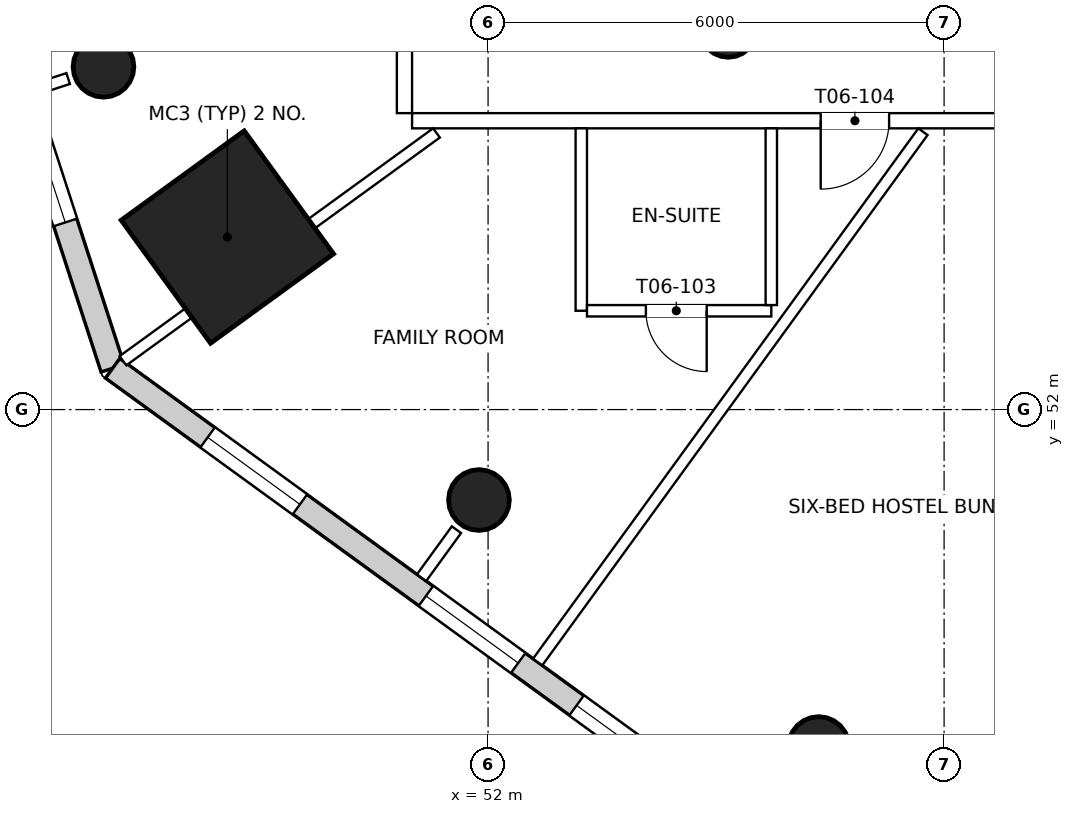
"""IFC4 building model, lengths in metres.
Left out: names, types, materials, properties, quantities, classifications, styles, units other than length and angle.
Written with IfcOpenShell. Run it as: python <this file> out.ifc"""

import sys

from ifc_helpers import new_model, si_unit, direction, frame, frame_2d, origin, origin_2d, place, context, subcontext, project, spatial, rectangle, circle, extrude, element, fill, save


model = new_model("IFC4")
c1 = context("Model", 3, precision=1e-05, world=origin(), true_north=direction((0.0, 1.0)))
c2 = subcontext(c1, "Body", "Model", "MODEL_VIEW")
j1 = project(units=[si_unit("LENGTHUNIT", "METRE"), si_unit("PLANEANGLEUNIT", "RADIAN")], contexts=[c1])
p1 = place(None, origin())
s1 = spatial("IfcSite", under=j1, at=p1, CompositionType="ELEMENT")
p2 = place(p1, origin())
s2 = spatial("IfcBuilding", under=s1, at=p2, CompositionType="ELEMENT")
p3 = place(p2, frame((0.0, 0.0, 98.6)))
s3 = spatial("IfcBuildingStorey", under=s2, at=p3, CompositionType="ELEMENT", Elevation=98.6)
p4 = place(p3, frame((46.94, 56.51, 0.0), z_axis=(0.0, 0.0, 1.0), x_axis=(1.0, 0.0, 0.0)))
e1 = element("IfcColumn", 1, at=p4, inside=s3, PredefinedType="COLUMN", context=c2, shape_type="SweptSolid", body=[
    extrude(circle(Radius=0.4, at=origin_2d()), origin(), (0.0, 0.0, 1.0), 3.9),
])
p5 = place(p3, frame((48.57, 54.27, 0.0), z_axis=(0.0, 0.0, 1.0), x_axis=(-0.809016994375, -0.587785252292, 0.0)))
e2 = element("IfcColumn", 2, at=p5, inside=s3, PredefinedType="COLUMN", context=c2, shape_type="SweptSolid", body=[
    extrude(rectangle(XDim=2.0, YDim=2.0, at=origin_2d()), origin(), (0.0, 0.0, 1.0), 3.9),
])
for number, where, z_axis, x_axis in (
    (3, (51.88, 50.81, 0.0), (0.0, 0.0, 1.0), (1.0, 0.0, 0.0)),
    (4, (56.35, 47.56, 0.0), (0.0, 0.0, 1.0), (1.0, 0.0, 0.0)),
):
    element("IfcColumn", number, at=place(p3, frame(where, z_axis=z_axis, x_axis=x_axis)), inside=s3, PredefinedType="COLUMN", context=c2, shape_type="SweptSolid", body=[
        extrude(circle(Radius=0.4, at=origin_2d()), origin(), (0.0, 0.0, 1.0), 3.9),
    ])
p6 = place(p3, frame((55.16, 57.01, 0.0), z_axis=(0.0, 0.0, 1.0), x_axis=(1.0, 0.0, 0.0)))
e5 = element("IfcColumn", 5, at=p6, inside=s3, PredefinedType="COLUMN", context=c2, shape_type="SweptSolid", body=[
    extrude(circle(Radius=0.375, at=origin_2d()), origin(), (0.0, 0.0, 1.0), 3.9),
])
p7 = place(p3, frame((44.238, 61.231, 0.0), z_axis=(0.0, 0.0, 1.0), x_axis=(0.309026240246, -0.95105351208, 0.0)))
e6 = element("IfcWall", 6, at=p7, inside=s3, PredefinedType="SOLIDWALL", context=c2, shape_type="SweptSolid", body=[
    extrude(rectangle(XDim=9.134, YDim=0.32, at=frame_2d((4.567, 0.0))), origin(), (0.0, 0.0, 1.0), 3.6),
])
p8 = place(p7, frame((2.267, 0.0, 0.9)))
e7 = element("IfcOpeningElement", 7, at=p8, cuts=e6, PredefinedType="OPENING", context=c2, shape_type="SweptSolid", body=[
    extrude(rectangle(XDim=1.6, YDim=1.8, at=frame_2d((0.8, 0.9))), frame((0.0, 0.17, 0.0), z_axis=(0.0, -1.0, 0.0), x_axis=(1.0, 0.0, 0.0)), (0.0, 0.0, 1.0), 0.34),
])
p9 = place(p7, frame((5.517, 0.0, 0.9)))
e8 = element("IfcOpeningElement", 8, at=p9, cuts=e6, PredefinedType="OPENING", context=c2, shape_type="SweptSolid", body=[
    extrude(rectangle(XDim=1.6, YDim=1.8, at=frame_2d((0.8, 0.9))), frame((0.0, 0.17, 0.0), z_axis=(0.0, -1.0, 0.0), x_axis=(1.0, 0.0, 0.0)), (0.0, 0.0, 1.0), 0.34),
])
p10 = place(p3, frame((47.06, 52.543, 0.0), z_axis=(0.0, 0.0, 1.0), x_axis=(0.809012643171, -0.587791241165, 0.0)))
e9 = element("IfcWall", 9, at=p10, inside=s3, PredefinedType="SOLIDWALL", context=c2, shape_type="SweptSolid", body=[
    extrude(rectangle(XDim=22.592, YDim=0.32, at=frame_2d((11.296, 0.0))), origin(), (0.0, 0.0, 1.0), 3.6),
])
p11 = place(p10, frame((1.546, 0.0, 0.9)))
e10 = element("IfcOpeningElement", 10, at=p11, cuts=e9, PredefinedType="OPENING", context=c2, shape_type="SweptSolid", body=[
    extrude(rectangle(XDim=1.5, YDim=1.8, at=frame_2d((0.75, 0.9))), frame((0.0, 0.17, 0.0), z_axis=(0.0, -1.0, 0.0), x_axis=(1.0, 0.0, 0.0)), (0.0, 0.0, 1.0), 0.34),
])
p12 = place(p10, frame((5.096, 0.0, 0.9)))
e11 = element("IfcOpeningElement", 11, at=p12, cuts=e9, PredefinedType="OPENING", context=c2, shape_type="SweptSolid", body=[
    extrude(rectangle(XDim=1.5, YDim=1.8, at=frame_2d((0.75, 0.9))), frame((0.0, 0.17, 0.0), z_axis=(0.0, -1.0, 0.0), x_axis=(1.0, 0.0, 0.0)), (0.0, 0.0, 1.0), 0.34),
])
p13 = place(p10, frame((7.546, 0.0, 0.9)))
e12 = element("IfcOpeningElement", 12, at=p13, cuts=e9, PredefinedType="OPENING", context=c2, shape_type="SweptSolid", body=[
    extrude(rectangle(XDim=1.5, YDim=1.8, at=frame_2d((0.75, 0.9))), frame((0.0, 0.17, 0.0), z_axis=(0.0, -1.0, 0.0), x_axis=(1.0, 0.0, 0.0)), (0.0, 0.0, 1.0), 0.34),
])
p14 = place(p10, frame((10.646, 0.0, 0.9)))
e13 = element("IfcOpeningElement", 13, at=p14, cuts=e9, PredefinedType="OPENING", context=c2, shape_type="SweptSolid", body=[
    extrude(rectangle(XDim=1.5, YDim=1.8, at=frame_2d((0.75, 0.9))), frame((0.0, 0.17, 0.0), z_axis=(0.0, -1.0, 0.0), x_axis=(1.0, 0.0, 0.0)), (0.0, 0.0, 1.0), 0.34),
])
p15 = place(p10, frame((13.546, 0.0, 0.9)))
e14 = element("IfcOpeningElement", 14, at=p15, cuts=e9, PredefinedType="OPENING", context=c2, shape_type="SweptSolid", body=[
    extrude(rectangle(XDim=1.5, YDim=1.8, at=frame_2d((0.75, 0.9))), frame((0.0, 0.17, 0.0), z_axis=(0.0, -1.0, 0.0), x_axis=(1.0, 0.0, 0.0)), (0.0, 0.0, 1.0), 0.34),
])
p16 = place(p10, frame((16.546, 0.0, 0.9)))
e15 = element("IfcOpeningElement", 15, at=p16, cuts=e9, PredefinedType="OPENING", context=c2, shape_type="SweptSolid", body=[
    extrude(rectangle(XDim=1.5, YDim=1.8, at=frame_2d((0.75, 0.9))), frame((0.0, 0.17, 0.0), z_axis=(0.0, -1.0, 0.0), x_axis=(1.0, 0.0, 0.0)), (0.0, 0.0, 1.0), 0.34),
])
p17 = place(p10, frame((19.546, 0.0, 0.9)))
e16 = element("IfcOpeningElement", 16, at=p17, cuts=e9, PredefinedType="OPENING", context=c2, shape_type="SweptSolid", body=[
    extrude(rectangle(XDim=1.5, YDim=1.8, at=frame_2d((0.75, 0.9))), frame((0.0, 0.17, 0.0), z_axis=(0.0, -1.0, 0.0), x_axis=(1.0, 0.0, 0.0)), (0.0, 0.0, 1.0), 0.34),
])
p18 = place(p3, frame((58.946, 55.8, 0.0), z_axis=(0.0, 0.0, 1.0), x_axis=(-1.0, 0.0, 0.0)))
e17 = element("IfcWall", 17, at=p18, inside=s3, PredefinedType="PARTITIONING", context=c2, shape_type="SweptSolid", body=[
    extrude(rectangle(XDim=7.946, YDim=0.2, at=frame_2d((3.973, 0.0))), origin(), (0.0, 0.0, 1.0), 3.0),
])
p19 = place(p18, frame((1.669, 0.0, 0.0)))
e18 = element("IfcOpeningElement", 18, at=p19, cuts=e17, PredefinedType="OPENING", context=c2, shape_type="SweptSolid", body=[
    extrude(rectangle(XDim=0.9, YDim=2.1, at=frame_2d((0.45, 1.05))), frame((0.0, 0.11, 0.0), z_axis=(0.0, -1.0, 0.0), x_axis=(1.0, 0.0, 0.0)), (0.0, 0.0, 1.0), 0.22),
])
p20 = place(p3, frame((50.9, 55.9, 0.0), z_axis=(0.0, 0.0, 1.0), x_axis=(0.0, 1.0, 0.0)))
e19 = element("IfcWall", 19, at=p20, inside=s3, PredefinedType="PARTITIONING", context=c2, shape_type="SweptSolid", body=[
    extrude(rectangle(XDim=7.95, YDim=0.2, at=frame_2d((3.975, 0.0))), origin(), (0.0, 0.0, 1.0), 3.6),
])
p21 = place(p20, frame((2.165, 0.0, 0.0)))
e20 = element("IfcOpeningElement", 20, at=p21, cuts=e19, PredefinedType="OPENING", context=c2, shape_type="SweptSolid", body=[
    extrude(rectangle(XDim=0.9, YDim=2.1, at=frame_2d((0.45, 1.05))), frame((0.0, 0.11, 0.0), z_axis=(0.0, -1.0, 0.0), x_axis=(1.0, 0.0, 0.0)), (0.0, 0.0, 1.0), 0.22),
])
p22 = place(p20, frame((6.228, 0.0, 0.0)))
e21 = element("IfcOpeningElement", 21, at=p22, cuts=e19, PredefinedType="OPENING", context=c2, shape_type="SweptSolid", body=[
    extrude(rectangle(XDim=0.9, YDim=2.1, at=frame_2d((0.45, 1.05))), frame((0.0, 0.11, 0.0), z_axis=(0.0, -1.0, 0.0), x_axis=(1.0, 0.0, 0.0)), (0.0, 0.0, 1.0), 0.22),
])
p23 = place(p3, frame((47.196, 52.642, 0.0), z_axis=(0.0, 0.0, 1.0), x_axis=(0.809009310944, 0.587795827483, 0.0)))
e22 = element("IfcWall", 22, at=p23, inside=s3, PredefinedType="PARTITIONING", context=c2, shape_type="SweptSolid", body=[
    extrude(rectangle(XDim=5.099, YDim=0.15, at=frame_2d((2.549, 0.0))), origin(), (0.0, 0.0, 1.0), 3.6),
])
p24 = place(p3, frame((52.652, 48.678, 0.0), z_axis=(0.0, 0.0, 1.0), x_axis=(0.587774405354, 0.809024875026, 0.0)))
e23 = element("IfcWall", 23, at=p24, inside=s3, PredefinedType="PARTITIONING", context=c2, shape_type="SweptSolid", body=[
    extrude(rectangle(XDim=8.625, YDim=0.15, at=frame_2d((4.312, 0.0))), origin(), (0.0, 0.0, 1.0), 3.0),
])
p25 = place(p3, frame((57.506, 45.152, 0.0), z_axis=(0.0, 0.0, 1.0), x_axis=(0.587783184234, 0.809018496903, 0.0)))
e24 = element("IfcWall", 24, at=p25, inside=s3, PredefinedType="PARTITIONING", context=c2, shape_type="SweptSolid", body=[
    extrude(rectangle(XDim=9.38, YDim=0.15, at=frame_2d((4.69, 0.0))), origin(), (0.0, 0.0, 1.0), 3.0),
])
p26 = place(p3, frame((53.227, 55.7, 0.0), z_axis=(0.0, 0.0, 1.0), x_axis=(0.0, -1.0, 0.0)))
e25 = element("IfcWall", 25, at=p26, inside=s3, PredefinedType="PARTITIONING", context=c2, shape_type="SweptSolid", body=[
    extrude(rectangle(XDim=2.4, YDim=0.15, at=frame_2d((1.2, 0.0))), origin(), (0.0, 0.0, 1.0), 3.6),
])
p27 = place(p3, frame((55.727, 53.3, 0.0), z_axis=(0.0, 0.0, 1.0), x_axis=(-1.0, 0.0, 0.0)))
e26 = element("IfcWall", 26, at=p27, inside=s3, PredefinedType="PARTITIONING", context=c2, shape_type="SweptSolid", body=[
    extrude(rectangle(XDim=2.425, YDim=0.15, at=frame_2d((1.212, 0.0))), origin(), (0.0, 0.0, 1.0), 3.6),
])
p28 = place(p27, frame((0.85, 0.0, 0.0)))
e27 = element("IfcOpeningElement", 27, at=p28, cuts=e26, PredefinedType="OPENING", context=c2, shape_type="SweptSolid", body=[
    extrude(rectangle(XDim=0.8, YDim=2.1, at=frame_2d((0.4, 1.05))), frame((0.0, 0.085, 0.0), z_axis=(0.0, -1.0, 0.0), x_axis=(1.0, 0.0, 0.0)), (0.0, 0.0, 1.0), 0.17),
])
p29 = place(p3, frame((55.727, 55.7, 0.0), z_axis=(0.0, 0.0, 1.0), x_axis=(0.0, -1.0, 0.0)))
e28 = element("IfcWall", 28, at=p29, inside=s3, PredefinedType="PARTITIONING", context=c2, shape_type="SweptSolid", body=[
    extrude(rectangle(XDim=2.325, YDim=0.15, at=frame_2d((1.163, 0.0))), origin(), (0.0, 0.0, 1.0), 3.6),
])
p30 = place(p3, frame((46.475, 56.355, 0.0), z_axis=(0.0, 0.0, 1.0), x_axis=(-0.951037957901, -0.309074105406, 0.0)))
e29 = element("IfcWall", 29, at=p30, inside=s3, PredefinedType="PARTITIONING", context=c2, shape_type="SweptSolid", body=[
    extrude(rectangle(XDim=0.461, YDim=0.15, at=frame_2d((0.231, 0.0))), origin(), (0.0, 0.0, 1.0), 3.6),
])
p31 = place(p3, frame((51.584, 50.42, 0.0), z_axis=(0.0, 0.0, 1.0), x_axis=(-0.587874171241, -0.808952383511, 0.0)))
e30 = element("IfcWall", 30, at=p31, inside=s3, PredefinedType="PARTITIONING", context=c2, shape_type="SweptSolid", body=[
    extrude(rectangle(XDim=0.781, YDim=0.15, at=frame_2d((0.39, 0.0))), origin(), (0.0, 0.0, 1.0), 3.6),
])
p32 = place(p9, origin())
e31 = element("IfcWindow", 31, at=p32, inside=s3, PartitioningType="SINGLE_PANEL", PredefinedType="WINDOW", context=c2, shape_type="SweptSolid", body=[
    extrude(rectangle(XDim=1.6, YDim=1.8, at=frame_2d((0.8, 0.9))), frame((0.0, 0.07, 0.0), z_axis=(0.0, -1.0, 0.0), x_axis=(1.0, 0.0, 0.0)), (0.0, 0.0, 1.0), 0.06),
])
fill(e8, e31)
p33 = place(p11, origin())
e32 = element("IfcWindow", 32, at=p33, inside=s3, PartitioningType="SINGLE_PANEL", PredefinedType="WINDOW", context=c2, shape_type="SweptSolid", body=[
    extrude(rectangle(XDim=1.5, YDim=1.8, at=frame_2d((0.75, 0.9))), frame((0.0, 0.07, 0.0), z_axis=(0.0, -1.0, 0.0), x_axis=(1.0, 0.0, 0.0)), (0.0, 0.0, 1.0), 0.06),
])
fill(e10, e32)
p34 = place(p12, origin())
e33 = element("IfcWindow", 33, at=p34, inside=s3, PartitioningType="SINGLE_PANEL", PredefinedType="WINDOW", context=c2, shape_type="SweptSolid", body=[
    extrude(rectangle(XDim=1.5, YDim=1.8, at=frame_2d((0.75, 0.9))), frame((0.0, 0.07, 0.0), z_axis=(0.0, -1.0, 0.0), x_axis=(1.0, 0.0, 0.0)), (0.0, 0.0, 1.0), 0.06),
])
fill(e11, e33)
p35 = place(p13, origin())
e34 = element("IfcWindow", 34, at=p35, inside=s3, PartitioningType="SINGLE_PANEL", PredefinedType="WINDOW", context=c2, shape_type="SweptSolid", body=[
    extrude(rectangle(XDim=1.5, YDim=1.8, at=frame_2d((0.75, 0.9))), frame((0.0, 0.07, 0.0), z_axis=(0.0, -1.0, 0.0), x_axis=(1.0, 0.0, 0.0)), (0.0, 0.0, 1.0), 0.06),
])
fill(e12, e34)
p36 = place(p28, origin())
e35 = element("IfcDoor", 35, at=p36, inside=s3, OperationType="SINGLE_SWING_LEFT", PredefinedType="DOOR", context=c2, shape_type="SweptSolid", body=[
    extrude(rectangle(XDim=0.8, YDim=2.1, at=frame_2d((0.4, 1.05))), frame((0.0, 0.025, 0.0), z_axis=(0.0, -1.0, 0.0), x_axis=(1.0, 0.0, 0.0)), (0.0, 0.0, 1.0), 0.05),
])
fill(e27, e35)
p37 = place(p19, origin())
e36 = element("IfcDoor", 36, at=p37, inside=s3, OperationType="SINGLE_SWING_RIGHT", PredefinedType="DOOR", context=c2, shape_type="SweptSolid", body=[
    extrude(rectangle(XDim=0.9, YDim=2.1, at=frame_2d((0.45, 1.05))), frame((0.0, 0.025, 0.0), z_axis=(0.0, -1.0, 0.0), x_axis=(1.0, 0.0, 0.0)), (0.0, 0.0, 1.0), 0.05),
])
fill(e18, e36)
save(model, sys.argv[1])
